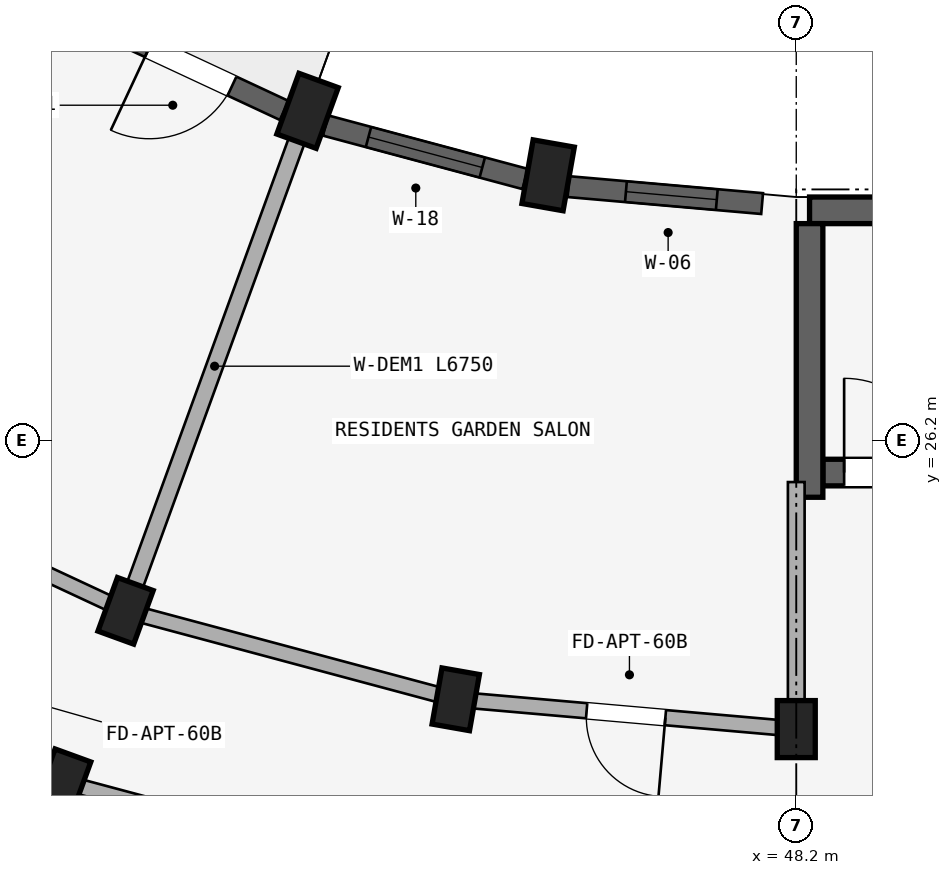
"""IFC4 building model, lengths in metres.
Left out: names, types, materials, properties, quantities, classifications, styles, units other than length and angle.
Written with IfcOpenShell. Run it as: python <this file> out.ifc"""

import sys

from ifc_helpers import new_model, si_unit, direction, frame, frame_2d, origin, origin_2d, place, context, subcontext, project, spatial, rectangle, extrude, element, fill, save


model = new_model("IFC4")
c1 = context("Model", 3, precision=1e-05, world=origin(), true_north=direction((0.0, 1.0)))
c2 = subcontext(c1, "Body", "Model", "MODEL_VIEW")
j1 = project(units=[si_unit("LENGTHUNIT", "METRE"), si_unit("PLANEANGLEUNIT", "RADIAN")], contexts=[c1])
p1 = place(None, origin())
s1 = spatial("IfcSite", under=j1, at=p1, CompositionType="ELEMENT")
p2 = place(p1, origin())
s2 = spatial("IfcBuilding", under=s1, at=p2, CompositionType="ELEMENT")
p3 = place(p2, frame((0.0, 0.0, 8.7)))
s3 = spatial("IfcBuildingStorey", under=s2, at=p3, CompositionType="ELEMENT", Elevation=8.7)
p4 = place(p3, frame((48.375, 29.225, 0.0), z_axis=(0.0, 0.0, 1.0), x_axis=(1.0, 0.0, 0.0)))
e1 = element("IfcWall", 1, at=p4, inside=s3, PredefinedType="SHEAR", context=c2, shape_type="SweptSolid", body=[
    extrude(rectangle(XDim=8.25, YDim=0.35, at=frame_2d((4.125, 0.0))), origin(), (0.0, 0.0, 1.0), 2.93),
])
p5 = place(p3, frame((48.55, 25.775, 0.0), z_axis=(0.0, 0.0, 1.0), x_axis=(1.0, 0.0, 0.0)))
e2 = element("IfcWall", 2, at=p5, inside=s3, PredefinedType="SHEAR", context=c2, shape_type="SweptSolid", body=[
    extrude(rectangle(XDim=7.9, YDim=0.35, at=frame_2d((3.95, 0.0))), origin(), (0.0, 0.0, 1.0), 2.93),
])
p6 = place(p5, frame((0.28, 0.0, 0.0)))
e3 = element("IfcOpeningElement", 3, at=p6, cuts=e2, PredefinedType="OPENING", context=c2, shape_type="SweptSolid", body=[
    extrude(rectangle(XDim=1.24, YDim=2.15, at=frame_2d((0.62, 1.075))), frame((0.0, 0.185, 0.0), z_axis=(0.0, -1.0, 0.0), x_axis=(1.0, 0.0, 0.0)), (0.0, 0.0, 1.0), 0.37),
])
p7 = place(p3, frame((48.375, 29.05, 0.0), z_axis=(0.0, 0.0, 1.0), x_axis=(0.0, -1.0, 0.0)))
e4 = element("IfcWall", 4, at=p7, inside=s3, PredefinedType="SHEAR", context=c2, shape_type="SweptSolid", body=[
    extrude(rectangle(XDim=3.6, YDim=0.35, at=frame_2d((1.8, 0.0))), origin(), (0.0, 0.0, 1.0), 2.93),
])
p8 = place(p3, frame((48.2, 22.4, 0.0), z_axis=(0.0, 0.0, 1.0), x_axis=(1.0, 0.0, 0.0)))
e5 = element("IfcColumn", 5, at=p8, inside=s3, PredefinedType="COLUMN", context=c2, shape_type="SweptSolid", body=[
    extrude(rectangle(XDim=0.5, YDim=0.75, at=origin_2d()), origin(), (0.0, 0.0, 1.0), 2.93),
])
p9 = place(p3, frame((44.935, 29.686, 0.0), z_axis=(0.0, 0.0, 1.0), x_axis=(-0.984807753012, 0.173648177667, 0.0)))
e6 = element("IfcColumn", 6, at=p9, inside=s3, PredefinedType="COLUMN", context=c2, shape_type="SweptSolid", body=[
    extrude(rectangle(XDim=0.55, YDim=0.85, at=origin_2d()), origin(), (0.0, 0.0, 1.0), 2.93),
])
p10 = place(p3, frame((43.72, 22.792, 0.0), z_axis=(0.0, 0.0, 1.0), x_axis=(-0.984807753012, 0.173648177667, 0.0)))
e7 = element("IfcColumn", 7, at=p10, inside=s3, PredefinedType="COLUMN", context=c2, shape_type="SweptSolid", body=[
    extrude(rectangle(XDim=0.5, YDim=0.75, at=origin_2d()), origin(), (0.0, 0.0, 1.0), 2.93),
])
p11 = place(p3, frame((41.77, 30.534, 0.0), z_axis=(0.0, 0.0, 1.0), x_axis=(-0.939692620786, 0.342020143326, 0.0)))
e8 = element("IfcColumn", 8, at=p11, inside=s3, PredefinedType="COLUMN", context=c2, shape_type="SweptSolid", body=[
    extrude(rectangle(XDim=0.55, YDim=0.85, at=origin_2d()), origin(), (0.0, 0.0, 1.0), 2.93),
])
for number, where, z_axis, x_axis in (
    (9, (39.376, 23.956, 0.0), (0.0, 0.0, 1.0), (-0.94, 0.342, 0.0)),
    (10, (38.555, 21.701, 0.0), (0.0, 0.0, 1.0), (-0.94, 0.342, 0.0)),
):
    element("IfcColumn", number, at=place(p3, frame(where, z_axis=z_axis, x_axis=x_axis)), inside=s3, PredefinedType="COLUMN", context=c2, shape_type="SweptSolid", body=[
        extrude(rectangle(XDim=0.5, YDim=0.75, at=origin_2d()), origin(), (0.0, 0.0, 1.0), 2.93),
    ])
p12 = place(p3, frame((48.2, 22.4, 0.0), z_axis=(0.0, 0.0, 1.0), x_axis=(-0.996191949488, 0.087187153726, 0.0)))
e11 = element("IfcWall", 11, at=p12, inside=s3, PredefinedType="STANDARD", context=c2, shape_type="SweptSolid", body=[
    extrude(rectangle(XDim=4.497, YDim=0.2, at=frame_2d((2.249, 0.0))), origin(), (0.0, 0.0, 1.0), 2.372),
])
p13 = place(p12, frame((1.729, 0.0, 0.0)))
e12 = element("IfcOpeningElement", 12, at=p13, cuts=e11, PredefinedType="OPENING", context=c2, shape_type="SweptSolid", body=[
    extrude(rectangle(XDim=1.04, YDim=2.15, at=frame_2d((0.52, 1.075))), frame((0.0, 0.11, 0.0), z_axis=(0.0, -1.0, 0.0), x_axis=(1.0, 0.0, 0.0)), (0.0, 0.0, 1.0), 0.22),
])
p14 = place(p3, frame((43.72, 22.792, 0.0), z_axis=(0.0, 0.0, 1.0), x_axis=(-0.965934240054, 0.258787642463, 0.0)))
e13 = element("IfcWall", 13, at=p14, inside=s3, PredefinedType="STANDARD", context=c2, shape_type="SweptSolid", body=[
    extrude(rectangle(XDim=4.497, YDim=0.2, at=frame_2d((2.249, 0.0))), origin(), (0.0, 0.0, 1.0), 2.372),
])
p15 = place(p3, frame((43.303, 20.428, 0.0), z_axis=(0.0, 0.0, 1.0), x_axis=(-0.965930095386, 0.258803112091, 0.0)))
e14 = element("IfcWall", 14, at=p15, inside=s3, PredefinedType="STANDARD", context=c2, shape_type="SweptSolid", body=[
    extrude(rectangle(XDim=4.916, YDim=0.2, at=frame_2d((2.458, 0.0))), origin(), (0.0, 0.0, 1.0), 2.372),
])
p16 = place(p3, frame((39.376, 23.956, 0.0), z_axis=(0.0, 0.0, 1.0), x_axis=(-0.906307919131, 0.422617978463, 0.0)))
e15 = element("IfcWall", 15, at=p16, inside=s3, PredefinedType="STANDARD", context=c2, shape_type="SweptSolid", body=[
    extrude(rectangle(XDim=4.497, YDim=0.2, at=frame_2d((2.249, 0.0))), origin(), (0.0, 0.0, 1.0), 2.372),
])
p17 = place(p16, frame((1.709, 0.0, 0.0)))
e16 = element("IfcOpeningElement", 16, at=p17, cuts=e15, PredefinedType="OPENING", context=c2, shape_type="SweptSolid", body=[
    extrude(rectangle(XDim=1.08, YDim=2.15, at=frame_2d((0.54, 1.075))), frame((0.0, 0.11, 0.0), z_axis=(0.0, -1.0, 0.0), x_axis=(1.0, 0.0, 0.0)), (0.0, 0.0, 1.0), 0.22),
])
p18 = place(p3, frame((38.555, 21.701, 0.0), z_axis=(0.0, 0.0, 1.0), x_axis=(-0.906302381024, 0.422629854778, 0.0)))
e17 = element("IfcWall", 17, at=p18, inside=s3, PredefinedType="STANDARD", context=c2, shape_type="SweptSolid", body=[
    extrude(rectangle(XDim=4.915, YDim=0.2, at=frame_2d((2.458, 0.0))), origin(), (0.0, 0.0, 1.0), 2.372),
])
p19 = place(p18, frame((1.938, 0.0, 0.0)))
e18 = element("IfcOpeningElement", 18, at=p19, cuts=e17, PredefinedType="OPENING", context=c2, shape_type="SweptSolid", body=[
    extrude(rectangle(XDim=1.04, YDim=2.15, at=frame_2d((0.52, 1.075))), frame((0.0, 0.11, 0.0), z_axis=(0.0, -1.0, 0.0), x_axis=(1.0, 0.0, 0.0)), (0.0, 0.0, 1.0), 0.22),
])
p20 = place(p3, frame((48.2, 25.65, 0.0), z_axis=(0.0, 0.0, 1.0), x_axis=(0.0, -1.0, 0.0)))
e19 = element("IfcWall", 19, at=p20, inside=s3, PredefinedType="STANDARD", context=c2, shape_type="SweptSolid", body=[
    extrude(rectangle(XDim=3.2, YDim=0.22, at=frame_2d((1.6, 0.0))), origin(), (0.0, 0.0, 1.0), 2.372),
])
p21 = place(p3, frame((41.702, 30.346, 0.0), z_axis=(0.0, 0.0, 1.0), x_axis=(-0.342010221662, -0.939696231917, 0.0)))
e20 = element("IfcWall", 20, at=p21, inside=s3, PredefinedType="STANDARD", context=c2, shape_type="SweptSolid", body=[
    extrude(rectangle(XDim=6.75, YDim=0.22, at=frame_2d((3.375, 0.0))), origin(), (0.0, 0.0, 1.0), 2.372),
])
p22 = place(p3, frame((38.521, 21.607, 0.0), z_axis=(0.0, 0.0, 1.0), x_axis=(-0.342022120477, -0.939691901159, 0.0)))
e21 = element("IfcWall", 21, at=p22, inside=s3, PredefinedType="STANDARD", context=c2, shape_type="SweptSolid", body=[
    extrude(rectangle(XDim=17.42, YDim=0.23, at=frame_2d((8.71, 0.0))), origin(), (0.0, 0.0, 1.0), 2.372),
])
p23 = place(p3, frame((47.751, 29.314, 0.0), z_axis=(0.0, 0.0, 1.0), x_axis=(-0.996194235595, 0.08716102895, 0.0)))
e22 = element("IfcWall", 22, at=p23, inside=s3, PredefinedType="STANDARD", context=c2, shape_type="SweptSolid", body=[
    extrude(rectangle(XDim=2.557, YDim=0.275, at=frame_2d((1.279, 0.0))), origin(), (0.0, 0.0, 1.0), 2.472),
])
p24 = place(p23, frame((0.599, 0.0, 0.772)))
e23 = element("IfcOpeningElement", 23, at=p24, cuts=e22, PredefinedType="OPENING", context=c2, shape_type="SweptSolid", body=[
    extrude(rectangle(XDim=1.2, YDim=1.5, at=frame_2d((0.6, 0.75))), frame((0.0, 0.147, 0.0), z_axis=(0.0, -1.0, 0.0), x_axis=(1.0, 0.0, 0.0)), (0.0, 0.0, 1.0), 0.295),
])
p25 = place(p3, frame((44.633, 29.637, 0.0), z_axis=(0.0, 0.0, 1.0), x_axis=(-0.965925595341, 0.258819907011, 0.0)))
e24 = element("IfcWall", 24, at=p25, inside=s3, PredefinedType="STANDARD", context=c2, shape_type="SweptSolid", body=[
    extrude(rectangle(XDim=2.718, YDim=0.275, at=frame_2d((1.359, 0.0))), origin(), (0.0, 0.0, 1.0), 2.472),
])
p26 = place(p25, frame((0.584, 0.0, 0.672)))
e25 = element("IfcOpeningElement", 25, at=p26, cuts=e24, PredefinedType="OPENING", context=c2, shape_type="SweptSolid", body=[
    extrude(rectangle(XDim=1.55, YDim=1.6, at=frame_2d((0.775, 0.8))), frame((0.0, 0.147, 0.0), z_axis=(0.0, -1.0, 0.0), x_axis=(1.0, 0.0, 0.0)), (0.0, 0.0, 1.0), 0.295),
])
p27 = place(p3, frame((41.464, 30.539, 0.0), z_axis=(0.0, 0.0, 1.0), x_axis=(-0.906311629168, 0.422610022166, 0.0)))
e26 = element("IfcWall", 26, at=p27, inside=s3, PredefinedType="STANDARD", context=c2, shape_type="SweptSolid", body=[
    extrude(rectangle(XDim=2.718, YDim=0.275, at=frame_2d((1.359, 0.0))), origin(), (0.0, 0.0, 1.0), 2.472),
])
p28 = place(p27, frame((0.759, 0.0, 0.0)))
e27 = element("IfcOpeningElement", 27, at=p28, cuts=e26, PredefinedType="OPENING", context=c2, shape_type="SweptSolid", body=[
    extrude(rectangle(XDim=1.2, YDim=2.15, at=frame_2d((0.6, 1.075))), frame((0.0, 0.147, 0.0), z_axis=(0.0, -1.0, 0.0), x_axis=(1.0, 0.0, 0.0)), (0.0, 0.0, 1.0), 0.295),
])
p29 = place(p24, origin())
e28 = element("IfcWindow", 28, at=p29, inside=s3, PartitioningType="SINGLE_PANEL", PredefinedType="WINDOW", context=c2, shape_type="SweptSolid", body=[
    extrude(rectangle(XDim=1.2, YDim=1.5, at=frame_2d((0.6, 0.75))), frame((0.0, 0.03, 0.0), z_axis=(0.0, -1.0, 0.0), x_axis=(1.0, 0.0, 0.0)), (0.0, 0.0, 1.0), 0.06),
])
fill(e23, e28)
p30 = place(p26, origin())
e29 = element("IfcWindow", 29, at=p30, inside=s3, PartitioningType="DOUBLE_PANEL_VERTICAL", PredefinedType="WINDOW", context=c2, shape_type="SweptSolid", body=[
    extrude(rectangle(XDim=1.55, YDim=1.6, at=frame_2d((0.775, 0.8))), frame((0.0, 0.03, 0.0), z_axis=(0.0, -1.0, 0.0), x_axis=(1.0, 0.0, 0.0)), (0.0, 0.0, 1.0), 0.06),
])
fill(e25, e29)
p31 = place(p6, origin())
e30 = element("IfcDoor", 30, at=p31, inside=s3, OperationType="SINGLE_SWING_LEFT", PredefinedType="DOOR", context=c2, shape_type="SweptSolid", body=[
    extrude(rectangle(XDim=1.24, YDim=2.15, at=frame_2d((0.62, 1.075))), frame((0.0, 0.025, 0.0), z_axis=(0.0, -1.0, 0.0), x_axis=(1.0, 0.0, 0.0)), (0.0, 0.0, 1.0), 0.05),
])
fill(e3, e30)
p32 = place(p13, origin())
e31 = element("IfcDoor", 31, at=p32, inside=s3, OperationType="SINGLE_SWING_LEFT", PredefinedType="DOOR", context=c2, shape_type="SweptSolid", body=[
    extrude(rectangle(XDim=1.04, YDim=2.15, at=frame_2d((0.52, 1.075))), frame((0.0, 0.025, 0.0), z_axis=(0.0, -1.0, 0.0), x_axis=(1.0, 0.0, 0.0)), (0.0, 0.0, 1.0), 0.05),
])
fill(e12, e31)
p33 = place(p28, frame((1.2, 0.0, 0.0), z_axis=(0.0, 0.0, 1.0), x_axis=(-1.0, 0.0, 0.0)))
e32 = element("IfcDoor", 32, at=p33, inside=s3, OperationType="SINGLE_SWING_LEFT", PredefinedType="DOOR", context=c2, shape_type="SweptSolid", body=[
    extrude(rectangle(XDim=1.2, YDim=2.15, at=frame_2d((0.6, 1.075))), frame((0.0, 0.025, 0.0), z_axis=(0.0, -1.0, 0.0), x_axis=(1.0, 0.0, 0.0)), (0.0, 0.0, 1.0), 0.05),
])
fill(e27, e32)
save(model, sys.argv[1])
